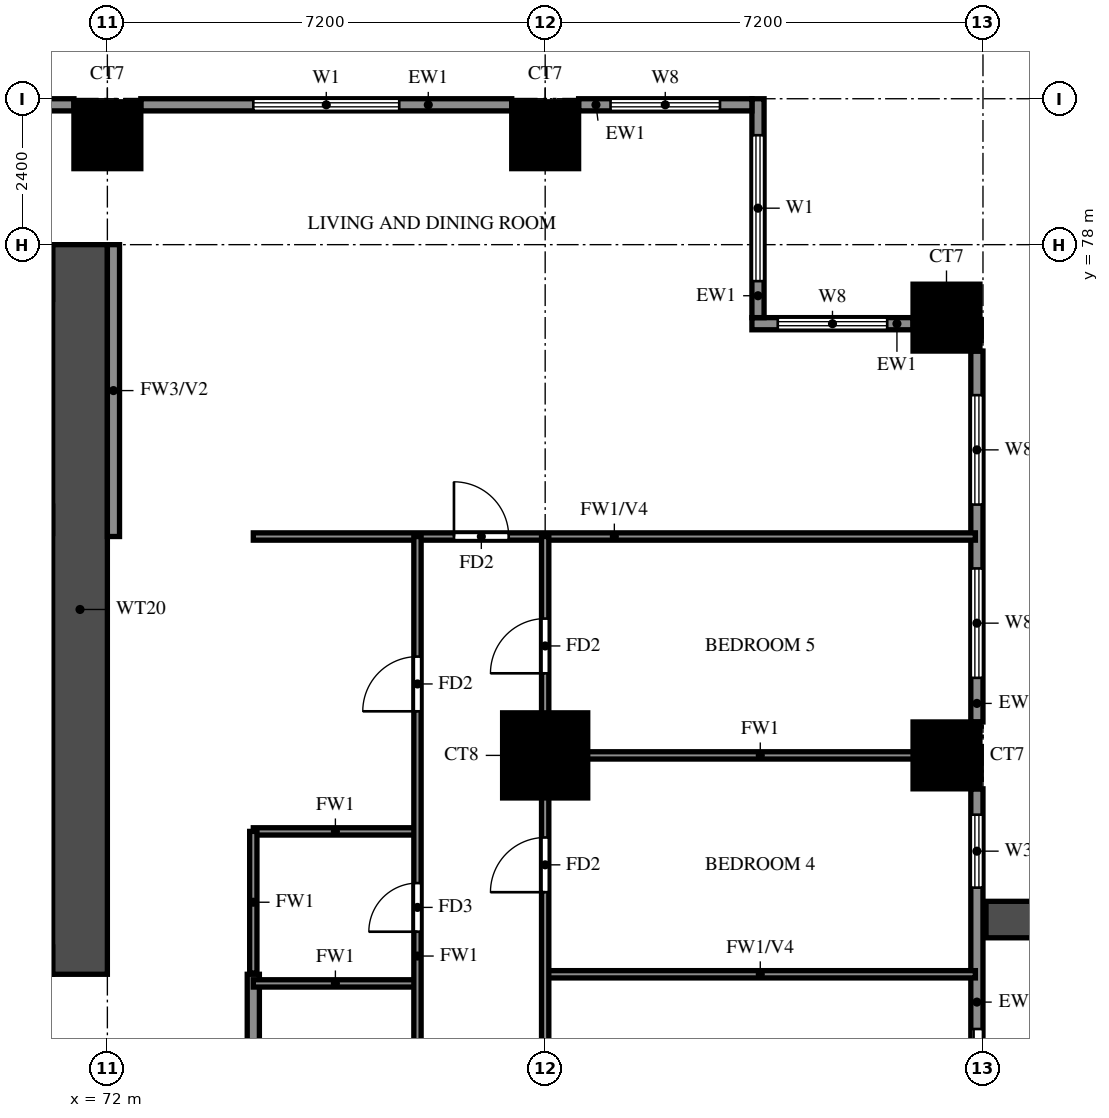
"""IFC4 building model, lengths in metres.
Left out: names, types, materials, properties, quantities, classifications, styles, units other than length and angle.
Written with IfcOpenShell. Run it as: python <this file> out.ifc"""

import sys

from ifc_helpers import new_model, si_unit, direction, frame, frame_2d, origin, origin_2d, place, context, subcontext, project, spatial, rectangle, extrude, source, transform, mapped, element, fill, save


model = new_model("IFC4")
c1 = context("Model", 3, precision=1e-05, world=origin(), true_north=direction((0.0, 1.0)))
c2 = subcontext(c1, "Body", "Model", "MODEL_VIEW")
j1 = project(units=[si_unit("LENGTHUNIT", "METRE"), si_unit("PLANEANGLEUNIT", "RADIAN")], contexts=[c1])
p1 = place(None, origin())
s1 = spatial("IfcSite", under=j1, at=p1, CompositionType="ELEMENT")
p2 = place(p1, origin())
s2 = spatial("IfcBuilding", under=s1, at=p2, CompositionType="ELEMENT")
p3 = place(p2, frame((0.0, 0.0, 37.5)))
s3 = spatial("IfcBuildingStorey", under=s2, at=p3, CompositionType="ELEMENT", Elevation=37.5)
m1 = source(origin(), c2, "Body", "SweptSolid", [
    extrude(rectangle(XDim=1.4, YDim=1.4, at=origin_2d()), origin(), (0.0, 0.0, 1.0), 3.18),
])
p4 = place(p3, frame((79.2, 69.6, 0.0), z_axis=(0.0, 0.0, 1.0), x_axis=(1.0, 0.0, 0.0)))
e1 = element("IfcColumn", 1, at=p4, inside=s3, PredefinedType="COLUMN", context=c2, shape_type="MappedRepresentation", body=[
    mapped(m1, transform((0.0, 0.0, 0.0))),
])
m2 = source(origin(), c2, "Body", "SweptSolid", [
    extrude(rectangle(XDim=1.1, YDim=1.1, at=origin_2d()), origin(), (0.0, 0.0, 1.0), 3.18),
])
for number, where, z_axis, x_axis in (
    (2, (85.8, 69.6, 0.0), (0.0, 0.0, 1.0), (1.0, 0.0, 0.0)),
    (3, (85.8, 76.8, 0.0), (0.0, 0.0, 1.0), (1.0, 0.0, 0.0)),
    (4, (72.0, 79.8, 0.0), (0.0, 0.0, 1.0), (1.0, 0.0, 0.0)),
    (5, (79.2, 79.8, 0.0), (0.0, 0.0, 1.0), (1.0, 0.0, 0.0)),
):
    element("IfcColumn", number, at=place(p3, frame(where, z_axis=z_axis, x_axis=x_axis)), inside=s3, PredefinedType="COLUMN", context=c2, shape_type="MappedRepresentation", body=[
        mapped(m2, transform((0.0, 0.0, 0.0))),
    ])
p5 = place(p3, frame((71.55, 66.0, 0.0), z_axis=(0.0, 0.0, 1.0), x_axis=(0.0, 1.0, 0.0)))
e6 = element("IfcWall", 6, at=p5, inside=s3, PredefinedType="SHEAR", context=c2, shape_type="SweptSolid", body=[
    extrude(rectangle(XDim=12.0, YDim=0.9, at=frame_2d((6.0, 0.0))), origin(), (0.0, 0.0, 1.0), 3.18),
])
p6 = place(p3, frame((29.7, 77.55, 0.0), z_axis=(0.0, 0.0, 1.0), x_axis=(1.0, 0.0, 0.0)))
e7 = element("IfcWall", 7, at=p6, inside=s3, PredefinedType="SHEAR", context=c2, shape_type="SweptSolid", body=[
    extrude(rectangle(XDim=41.4, YDim=0.9, at=frame_2d((20.7, 0.0))), origin(), (0.0, 0.0, 1.0), 3.18),
])
p7 = place(p3, frame((29.7, 66.225, 0.0), z_axis=(0.0, 0.0, 1.0), x_axis=(1.0, 0.0, 0.0)))
e8 = element("IfcWall", 8, at=p7, inside=s3, PredefinedType="SHEAR", context=c2, shape_type="SweptSolid", body=[
    extrude(rectangle(XDim=41.4, YDim=0.45, at=frame_2d((20.7, 0.0))), origin(), (0.0, 0.0, 1.0), 3.18),
])
p8 = place(p7, frame((0.925, 0.0, 0.0)))
e9 = element("IfcOpeningElement", 9, at=p8, cuts=e8, PredefinedType="OPENING", context=c2, shape_type="SweptSolid", body=[
    extrude(rectangle(XDim=1.1, YDim=2.1, at=frame_2d((0.55, 1.05))), frame((0.0, 0.235, 0.0), z_axis=(0.0, -1.0, 0.0), x_axis=(1.0, 0.0, 0.0)), (0.0, 0.0, 1.0), 0.47),
])
p9 = place(p7, frame((3.738, 0.0, 0.0)))
e10 = element("IfcOpeningElement", 10, at=p9, cuts=e8, PredefinedType="OPENING", context=c2, shape_type="SweptSolid", body=[
    extrude(rectangle(XDim=1.8, YDim=2.1, at=frame_2d((0.9, 1.05))), frame((0.0, 0.235, 0.0), z_axis=(0.0, -1.0, 0.0), x_axis=(1.0, 0.0, 0.0)), (0.0, 0.0, 1.0), 0.47),
])
p10 = place(p3, frame((86.3, 62.95, 0.0), z_axis=(0.0, 0.0, 1.0), x_axis=(0.0, 1.0, 0.0)))
e11 = element("IfcWall", 11, at=p10, inside=s3, PredefinedType="SOLIDWALL", context=c2, shape_type="SweptSolid", body=[
    extrude(rectangle(XDim=6.1, YDim=0.2, at=frame_2d((3.05, 0.0))), origin(), (0.0, 0.0, 1.0), 3.18),
])
p11 = place(p10, frame((0.35, 0.0, 0.0)))
e12 = element("IfcOpeningElement", 12, at=p11, cuts=e11, PredefinedType="OPENING", context=c2, shape_type="SweptSolid", body=[
    extrude(rectangle(XDim=1.8, YDim=2.4, at=frame_2d((0.9, 1.2))), frame((0.0, 0.11, 0.0), z_axis=(0.0, -1.0, 0.0), x_axis=(1.0, 0.0, 0.0)), (0.0, 0.0, 1.0), 0.22),
])
p12 = place(p10, frame((4.475, 0.0, 0.6)))
e13 = element("IfcOpeningElement", 13, at=p12, cuts=e11, PredefinedType="OPENING", context=c2, shape_type="SweptSolid", body=[
    extrude(rectangle(XDim=1.2, YDim=2.4, at=frame_2d((0.6, 1.2))), frame((0.0, 0.11, 0.0), z_axis=(0.0, -1.0, 0.0), x_axis=(1.0, 0.0, 0.0)), (0.0, 0.0, 1.0), 0.22),
])
p13 = place(p3, frame((86.3, 70.15, 0.0), z_axis=(0.0, 0.0, 1.0), x_axis=(0.0, 1.0, 0.0)))
e14 = element("IfcWall", 14, at=p13, inside=s3, PredefinedType="SOLIDWALL", context=c2, shape_type="SweptSolid", body=[
    extrude(rectangle(XDim=6.1, YDim=0.2, at=frame_2d((3.05, 0.0))), origin(), (0.0, 0.0, 1.0), 3.18),
])
p14 = place(p13, frame((0.725, 0.0, 0.6)))
e15 = element("IfcOpeningElement", 15, at=p14, cuts=e14, PredefinedType="OPENING", context=c2, shape_type="SweptSolid", body=[
    extrude(rectangle(XDim=1.8, YDim=2.4, at=frame_2d((0.9, 1.2))), frame((0.0, 0.11, 0.0), z_axis=(0.0, -1.0, 0.0), x_axis=(1.0, 0.0, 0.0)), (0.0, 0.0, 1.0), 0.22),
])
p15 = place(p13, frame((3.575, 0.0, 0.6)))
e16 = element("IfcOpeningElement", 16, at=p15, cuts=e14, PredefinedType="OPENING", context=c2, shape_type="SweptSolid", body=[
    extrude(rectangle(XDim=1.8, YDim=2.4, at=frame_2d((0.9, 1.2))), frame((0.0, 0.11, 0.0), z_axis=(0.0, -1.0, 0.0), x_axis=(1.0, 0.0, 0.0)), (0.0, 0.0, 1.0), 0.22),
])
p16 = place(p3, frame((85.25, 76.7, 0.0), z_axis=(0.0, 0.0, 1.0), x_axis=(-1.0, 0.0, 0.0)))
e17 = element("IfcWall", 17, at=p16, inside=s3, PredefinedType="SOLIDWALL", context=c2, shape_type="SweptSolid", body=[
    extrude(rectangle(XDim=2.65, YDim=0.2, at=frame_2d((1.325, 0.0))), origin(), (0.0, 0.0, 1.0), 3.18),
])
p17 = place(p16, frame((0.425, 0.0, 0.6)))
e18 = element("IfcOpeningElement", 18, at=p17, cuts=e17, PredefinedType="OPENING", context=c2, shape_type="SweptSolid", body=[
    extrude(rectangle(XDim=1.8, YDim=2.4, at=frame_2d((0.9, 1.2))), frame((0.0, 0.11, 0.0), z_axis=(0.0, -1.0, 0.0), x_axis=(1.0, 0.0, 0.0)), (0.0, 0.0, 1.0), 0.22),
])
p18 = place(p3, frame((82.7, 76.8, 0.0), z_axis=(0.0, 0.0, 1.0), x_axis=(0.0, 1.0, 0.0)))
e19 = element("IfcWall", 19, at=p18, inside=s3, PredefinedType="SOLIDWALL", context=c2, shape_type="SweptSolid", body=[
    extrude(rectangle(XDim=3.6, YDim=0.2, at=frame_2d((1.8, 0.0))), origin(), (0.0, 0.0, 1.0), 3.18),
])
p19 = place(p18, frame((0.6, 0.0, 0.6)))
e20 = element("IfcOpeningElement", 20, at=p19, cuts=e19, PredefinedType="OPENING", context=c2, shape_type="SweptSolid", body=[
    extrude(rectangle(XDim=2.4, YDim=2.4, at=frame_2d((1.2, 1.2))), frame((0.0, 0.11, 0.0), z_axis=(0.0, -1.0, 0.0), x_axis=(1.0, 0.0, 0.0)), (0.0, 0.0, 1.0), 0.22),
])
p20 = place(p3, frame((82.6, 80.3, 0.0), z_axis=(0.0, 0.0, 1.0), x_axis=(-1.0, 0.0, 0.0)))
e21 = element("IfcWall", 21, at=p20, inside=s3, PredefinedType="SOLIDWALL", context=c2, shape_type="SweptSolid", body=[
    extrude(rectangle(XDim=2.85, YDim=0.2, at=frame_2d((1.425, 0.0))), origin(), (0.0, 0.0, 1.0), 3.18),
])
p21 = place(p20, frame((0.525, 0.0, 0.6)))
e22 = element("IfcOpeningElement", 22, at=p21, cuts=e21, PredefinedType="OPENING", context=c2, shape_type="SweptSolid", body=[
    extrude(rectangle(XDim=1.8, YDim=2.4, at=frame_2d((0.9, 1.2))), frame((0.0, 0.11, 0.0), z_axis=(0.0, -1.0, 0.0), x_axis=(1.0, 0.0, 0.0)), (0.0, 0.0, 1.0), 0.22),
])
p22 = place(p3, frame((78.65, 80.3, 0.0), z_axis=(0.0, 0.0, 1.0), x_axis=(-1.0, 0.0, 0.0)))
e23 = element("IfcWall", 23, at=p22, inside=s3, PredefinedType="SOLIDWALL", context=c2, shape_type="SweptSolid", body=[
    extrude(rectangle(XDim=6.1, YDim=0.2, at=frame_2d((3.05, 0.0))), origin(), (0.0, 0.0, 1.0), 3.18),
])
p23 = place(p22, frame((1.85, 0.0, 0.6)))
e24 = element("IfcOpeningElement", 24, at=p23, cuts=e23, PredefinedType="OPENING", context=c2, shape_type="SweptSolid", body=[
    extrude(rectangle(XDim=2.4, YDim=2.4, at=frame_2d((1.2, 1.2))), frame((0.0, 0.11, 0.0), z_axis=(0.0, -1.0, 0.0), x_axis=(1.0, 0.0, 0.0)), (0.0, 0.0, 1.0), 0.22),
])
p24 = place(p3, frame((71.45, 80.3, 0.0), z_axis=(0.0, 0.0, 1.0), x_axis=(-1.0, 0.0, 0.0)))
e25 = element("IfcWall", 25, at=p24, inside=s3, PredefinedType="SOLIDWALL", context=c2, shape_type="SweptSolid", body=[
    extrude(rectangle(XDim=6.1, YDim=0.2, at=frame_2d((3.05, 0.0))), origin(), (0.0, 0.0, 1.0), 3.18),
])
p25 = place(p3, frame((86.45, 66.9, 0.0), z_axis=(0.0, 0.0, 1.0), x_axis=(1.0, 0.0, 0.0)))
e26 = element("IfcWall", 26, at=p25, inside=s3, PredefinedType="SOLIDWALL", context=c2, shape_type="SweptSolid", body=[
    extrude(rectangle(XDim=2.65, YDim=0.6, at=frame_2d((1.325, 0.0))), origin(), (0.0, 0.0, 1.0), 2.85),
])
p26 = place(p3, frame((72.1, 73.2, 0.0), z_axis=(0.0, 0.0, 1.0), x_axis=(0.0, 1.0, 0.0)))
e27 = element("IfcWall", 27, at=p26, inside=s3, PredefinedType="SOLIDWALL", context=c2, shape_type="SweptSolid", body=[
    extrude(rectangle(XDim=4.8, YDim=0.2, at=frame_2d((2.4, 0.0))), origin(), (0.0, 0.0, 1.0), 3.18),
])
p27 = place(p3, frame((74.4, 56.4, 0.0), z_axis=(0.0, 0.0, 1.0), x_axis=(0.0, 1.0, 0.0)))
e28 = element("IfcWall", 28, at=p27, inside=s3, PredefinedType="SOLIDWALL", context=c2, shape_type="SweptSolid", body=[
    extrude(rectangle(XDim=9.6, YDim=0.2, at=frame_2d((4.8, 0.0))), origin(), (0.0, 0.0, 1.0), 3.18),
])
p28 = place(p27, frame((0.7, 0.0, 0.0)))
e29 = element("IfcOpeningElement", 29, at=p28, cuts=e28, PredefinedType="OPENING", context=c2, shape_type="SweptSolid", body=[
    extrude(rectangle(XDim=1.0, YDim=2.1, at=frame_2d((0.5, 1.05))), frame((0.0, 0.11, 0.0), z_axis=(0.0, -1.0, 0.0), x_axis=(1.0, 0.0, 0.0)), (0.0, 0.0, 1.0), 0.22),
])
p29 = place(p27, frame((3.1, 0.0, 0.0)))
e30 = element("IfcOpeningElement", 30, at=p29, cuts=e28, PredefinedType="OPENING", context=c2, shape_type="SweptSolid", body=[
    extrude(rectangle(XDim=1.0, YDim=2.1, at=frame_2d((0.5, 1.05))), frame((0.0, 0.11, 0.0), z_axis=(0.0, -1.0, 0.0), x_axis=(1.0, 0.0, 0.0)), (0.0, 0.0, 1.0), 0.22),
])
p30 = place(p3, frame((74.4, 65.85, 0.0), z_axis=(0.0, 0.0, 1.0), x_axis=(1.0, 0.0, 0.0)))
e31 = element("IfcWall", 31, at=p30, inside=s3, PredefinedType="PARTITIONING", context=c2, shape_type="SweptSolid", body=[
    extrude(rectangle(XDim=2.7, YDim=0.12, at=frame_2d((1.35, 0.0))), origin(), (0.0, 0.0, 1.0), 3.18),
])
p31 = place(p3, frame((79.2, 66.0, 0.0), z_axis=(0.0, 0.0, 1.0), x_axis=(1.0, 0.0, 0.0)))
e32 = element("IfcWall", 32, at=p31, inside=s3, PredefinedType="PARTITIONING", context=c2, shape_type="SweptSolid", body=[
    extrude(rectangle(XDim=7.075, YDim=0.12, at=frame_2d((3.538, 0.0))), origin(), (0.0, 0.0, 1.0), 2.28),
])
p32 = place(p3, frame((74.4, 68.35, 0.0), z_axis=(0.0, 0.0, 1.0), x_axis=(1.0, 0.0, 0.0)))
e33 = element("IfcWall", 33, at=p32, inside=s3, PredefinedType="PARTITIONING", context=c2, shape_type="SweptSolid", body=[
    extrude(rectangle(XDim=2.7, YDim=0.12, at=frame_2d((1.35, 0.0))), origin(), (0.0, 0.0, 1.0), 3.18),
])
p33 = place(p3, frame((79.2, 69.6, 0.0), z_axis=(0.0, 0.0, 1.0), x_axis=(1.0, 0.0, 0.0)))
e34 = element("IfcWall", 34, at=p33, inside=s3, PredefinedType="PARTITIONING", context=c2, shape_type="SweptSolid", body=[
    extrude(rectangle(XDim=7.075, YDim=0.12, at=frame_2d((3.538, 0.0))), origin(), (0.0, 0.0, 1.0), 3.18),
])
p34 = place(p3, frame((74.4, 73.2, 0.0), z_axis=(0.0, 0.0, 1.0), x_axis=(1.0, 0.0, 0.0)))
e35 = element("IfcWall", 35, at=p34, inside=s3, PredefinedType="PARTITIONING", context=c2, shape_type="SweptSolid", body=[
    extrude(rectangle(XDim=11.875, YDim=0.12, at=frame_2d((5.938, 0.0))), origin(), (0.0, 0.0, 1.0), 2.28),
])
p35 = place(p34, frame((3.3, 0.0, 0.0)))
e36 = element("IfcOpeningElement", 36, at=p35, cuts=e35, PredefinedType="OPENING", context=c2, shape_type="SweptSolid", body=[
    extrude(rectangle(XDim=0.9, YDim=2.1, at=frame_2d((0.45, 1.05))), frame((0.0, 0.07, 0.0), z_axis=(0.0, -1.0, 0.0), x_axis=(1.0, 0.0, 0.0)), (0.0, 0.0, 1.0), 0.14),
])
p36 = place(p3, frame((74.4, 66.02, 0.0), z_axis=(0.0, 0.0, 1.0), x_axis=(0.0, 1.0, 0.0)))
e37 = element("IfcWall", 37, at=p36, inside=s3, PredefinedType="PARTITIONING", context=c2, shape_type="SweptSolid", body=[
    extrude(rectangle(XDim=2.33, YDim=0.12, at=frame_2d((1.165, 0.0))), origin(), (0.0, 0.0, 1.0), 3.18),
])
p37 = place(p3, frame((77.1, 61.2, 0.0), z_axis=(0.0, 0.0, 1.0), x_axis=(0.0, 1.0, 0.0)))
e38 = element("IfcWall", 38, at=p37, inside=s3, PredefinedType="PARTITIONING", context=c2, shape_type="SweptSolid", body=[
    extrude(rectangle(XDim=12.0, YDim=0.12, at=frame_2d((6.0, 0.0))), origin(), (0.0, 0.0, 1.0), 3.18),
])
p38 = place(p37, frame((1.875, 0.0, 0.0)))
e39 = element("IfcOpeningElement", 39, at=p38, cuts=e38, PredefinedType="OPENING", context=c2, shape_type="SweptSolid", body=[
    extrude(rectangle(XDim=0.9, YDim=2.1, at=frame_2d((0.45, 1.05))), frame((0.0, 0.07, 0.0), z_axis=(0.0, -1.0, 0.0), x_axis=(1.0, 0.0, 0.0)), (0.0, 0.0, 1.0), 0.14),
])
p39 = place(p37, frame((5.5, 0.0, 0.0)))
e40 = element("IfcOpeningElement", 40, at=p39, cuts=e38, PredefinedType="OPENING", context=c2, shape_type="SweptSolid", body=[
    extrude(rectangle(XDim=0.8, YDim=2.1, at=frame_2d((0.4, 1.05))), frame((0.0, 0.07, 0.0), z_axis=(0.0, -1.0, 0.0), x_axis=(1.0, 0.0, 0.0)), (0.0, 0.0, 1.0), 0.14),
])
p40 = place(p37, frame((9.125, 0.0, 0.0)))
e41 = element("IfcOpeningElement", 41, at=p40, cuts=e38, PredefinedType="OPENING", context=c2, shape_type="SweptSolid", body=[
    extrude(rectangle(XDim=0.9, YDim=2.1, at=frame_2d((0.45, 1.05))), frame((0.0, 0.07, 0.0), z_axis=(0.0, -1.0, 0.0), x_axis=(1.0, 0.0, 0.0)), (0.0, 0.0, 1.0), 0.14),
])
p41 = place(p3, frame((79.2, 55.2, 0.0), z_axis=(0.0, 0.0, 1.0), x_axis=(0.0, 1.0, 0.0)))
e42 = element("IfcWall", 42, at=p41, inside=s3, PredefinedType="PARTITIONING", context=c2, shape_type="SweptSolid", body=[
    extrude(rectangle(XDim=18.0, YDim=0.12, at=frame_2d((9.0, 0.0))), origin(), (0.0, 0.0, 1.0), 3.18),
])
p42 = place(p41, frame((1.05, 0.0, 0.0)))
e43 = element("IfcOpeningElement", 43, at=p42, cuts=e42, PredefinedType="OPENING", context=c2, shape_type="SweptSolid", body=[
    extrude(rectangle(XDim=1.5, YDim=2.1, at=frame_2d((0.75, 1.05))), frame((0.0, 0.07, 0.0), z_axis=(0.0, -1.0, 0.0), x_axis=(1.0, 0.0, 0.0)), (0.0, 0.0, 1.0), 0.14),
])
p43 = place(p41, frame((4.95, 0.0, 0.0)))
e44 = element("IfcOpeningElement", 44, at=p43, cuts=e42, PredefinedType="OPENING", context=c2, shape_type="SweptSolid", body=[
    extrude(rectangle(XDim=0.9, YDim=2.1, at=frame_2d((0.45, 1.05))), frame((0.0, 0.07, 0.0), z_axis=(0.0, -1.0, 0.0), x_axis=(1.0, 0.0, 0.0)), (0.0, 0.0, 1.0), 0.14),
])
p44 = place(p41, frame((8.55, 0.0, 0.0)))
e45 = element("IfcOpeningElement", 45, at=p44, cuts=e42, PredefinedType="OPENING", context=c2, shape_type="SweptSolid", body=[
    extrude(rectangle(XDim=0.9, YDim=2.1, at=frame_2d((0.45, 1.05))), frame((0.0, 0.07, 0.0), z_axis=(0.0, -1.0, 0.0), x_axis=(1.0, 0.0, 0.0)), (0.0, 0.0, 1.0), 0.14),
])
p45 = place(p41, frame((12.15, 0.0, 0.0)))
e46 = element("IfcOpeningElement", 46, at=p45, cuts=e42, PredefinedType="OPENING", context=c2, shape_type="SweptSolid", body=[
    extrude(rectangle(XDim=0.9, YDim=2.1, at=frame_2d((0.45, 1.05))), frame((0.0, 0.07, 0.0), z_axis=(0.0, -1.0, 0.0), x_axis=(1.0, 0.0, 0.0)), (0.0, 0.0, 1.0), 0.14),
])
p46 = place(p41, frame((15.75, 0.0, 0.0)))
e47 = element("IfcOpeningElement", 47, at=p46, cuts=e42, PredefinedType="OPENING", context=c2, shape_type="SweptSolid", body=[
    extrude(rectangle(XDim=0.9, YDim=2.1, at=frame_2d((0.45, 1.05))), frame((0.0, 0.07, 0.0), z_axis=(0.0, -1.0, 0.0), x_axis=(1.0, 0.0, 0.0)), (0.0, 0.0, 1.0), 0.14),
])
p47 = place(p11, origin())
e48 = element("IfcDoor", 48, at=p47, inside=s3, OperationType="DOUBLE_DOOR_SLIDING", PredefinedType="DOOR", context=c2, shape_type="SweptSolid", body=[
    extrude(rectangle(XDim=1.8, YDim=2.4, at=frame_2d((0.9, 1.2))), frame((0.0, 0.025, 0.0), z_axis=(0.0, -1.0, 0.0), x_axis=(1.0, 0.0, 0.0)), (0.0, 0.0, 1.0), 0.05),
])
fill(e12, e48)
p48 = place(p12, origin())
e49 = element("IfcWindow", 49, at=p48, inside=s3, PartitioningType="SINGLE_PANEL", PredefinedType="WINDOW", context=c2, shape_type="SweptSolid", body=[
    extrude(rectangle(XDim=1.2, YDim=2.4, at=frame_2d((0.6, 1.2))), frame((0.0, 0.03, 0.0), z_axis=(0.0, -1.0, 0.0), x_axis=(1.0, 0.0, 0.0)), (0.0, 0.0, 1.0), 0.06),
])
fill(e13, e49)
p49 = place(p14, origin())
e50 = element("IfcWindow", 50, at=p49, inside=s3, PartitioningType="DOUBLE_PANEL_VERTICAL", PredefinedType="WINDOW", context=c2, shape_type="SweptSolid", body=[
    extrude(rectangle(XDim=1.8, YDim=2.4, at=frame_2d((0.9, 1.2))), frame((0.0, 0.03, 0.0), z_axis=(0.0, -1.0, 0.0), x_axis=(1.0, 0.0, 0.0)), (0.0, 0.0, 1.0), 0.06),
])
fill(e15, e50)
p50 = place(p15, origin())
e51 = element("IfcWindow", 51, at=p50, inside=s3, PartitioningType="DOUBLE_PANEL_VERTICAL", PredefinedType="WINDOW", context=c2, shape_type="SweptSolid", body=[
    extrude(rectangle(XDim=1.8, YDim=2.4, at=frame_2d((0.9, 1.2))), frame((0.0, 0.03, 0.0), z_axis=(0.0, -1.0, 0.0), x_axis=(1.0, 0.0, 0.0)), (0.0, 0.0, 1.0), 0.06),
])
fill(e16, e51)
p51 = place(p17, origin())
e52 = element("IfcWindow", 52, at=p51, inside=s3, PartitioningType="DOUBLE_PANEL_VERTICAL", PredefinedType="WINDOW", context=c2, shape_type="SweptSolid", body=[
    extrude(rectangle(XDim=1.8, YDim=2.4, at=frame_2d((0.9, 1.2))), frame((0.0, 0.03, 0.0), z_axis=(0.0, -1.0, 0.0), x_axis=(1.0, 0.0, 0.0)), (0.0, 0.0, 1.0), 0.06),
])
fill(e18, e52)
p52 = place(p19, origin())
e53 = element("IfcWindow", 53, at=p52, inside=s3, PartitioningType="DOUBLE_PANEL_VERTICAL", PredefinedType="WINDOW", context=c2, shape_type="SweptSolid", body=[
    extrude(rectangle(XDim=2.4, YDim=2.4, at=frame_2d((1.2, 1.2))), frame((0.0, 0.03, 0.0), z_axis=(0.0, -1.0, 0.0), x_axis=(1.0, 0.0, 0.0)), (0.0, 0.0, 1.0), 0.06),
])
fill(e20, e53)
p53 = place(p21, origin())
e54 = element("IfcWindow", 54, at=p53, inside=s3, PartitioningType="DOUBLE_PANEL_VERTICAL", PredefinedType="WINDOW", context=c2, shape_type="SweptSolid", body=[
    extrude(rectangle(XDim=1.8, YDim=2.4, at=frame_2d((0.9, 1.2))), frame((0.0, 0.03, 0.0), z_axis=(0.0, -1.0, 0.0), x_axis=(1.0, 0.0, 0.0)), (0.0, 0.0, 1.0), 0.06),
])
fill(e22, e54)
p54 = place(p23, origin())
e55 = element("IfcWindow", 55, at=p54, inside=s3, PartitioningType="DOUBLE_PANEL_VERTICAL", PredefinedType="WINDOW", context=c2, shape_type="SweptSolid", body=[
    extrude(rectangle(XDim=2.4, YDim=2.4, at=frame_2d((1.2, 1.2))), frame((0.0, 0.03, 0.0), z_axis=(0.0, -1.0, 0.0), x_axis=(1.0, 0.0, 0.0)), (0.0, 0.0, 1.0), 0.06),
])
fill(e24, e55)
p55 = place(p45, origin())
e56 = element("IfcDoor", 56, at=p55, inside=s3, OperationType="SINGLE_SWING_RIGHT", PredefinedType="DOOR", context=c2, shape_type="SweptSolid", body=[
    extrude(rectangle(XDim=0.9, YDim=2.1, at=frame_2d((0.45, 1.05))), frame((0.0, 0.025, 0.0), z_axis=(0.0, -1.0, 0.0), x_axis=(1.0, 0.0, 0.0)), (0.0, 0.0, 1.0), 0.05),
])
fill(e46, e56)
p56 = place(p46, origin())
e57 = element("IfcDoor", 57, at=p56, inside=s3, OperationType="SINGLE_SWING_LEFT", PredefinedType="DOOR", context=c2, shape_type="SweptSolid", body=[
    extrude(rectangle(XDim=0.9, YDim=2.1, at=frame_2d((0.45, 1.05))), frame((0.0, 0.025, 0.0), z_axis=(0.0, -1.0, 0.0), x_axis=(1.0, 0.0, 0.0)), (0.0, 0.0, 1.0), 0.05),
])
fill(e47, e57)
p57 = place(p35, origin())
e58 = element("IfcDoor", 58, at=p57, inside=s3, OperationType="SINGLE_SWING_LEFT", PredefinedType="DOOR", context=c2, shape_type="SweptSolid", body=[
    extrude(rectangle(XDim=0.9, YDim=2.1, at=frame_2d((0.45, 1.05))), frame((0.0, 0.025, 0.0), z_axis=(0.0, -1.0, 0.0), x_axis=(1.0, 0.0, 0.0)), (0.0, 0.0, 1.0), 0.05),
])
fill(e36, e58)
p58 = place(p39, origin())
e59 = element("IfcDoor", 59, at=p58, inside=s3, OperationType="SINGLE_SWING_LEFT", PredefinedType="DOOR", context=c2, shape_type="SweptSolid", body=[
    extrude(rectangle(XDim=0.8, YDim=2.1, at=frame_2d((0.4, 1.05))), frame((0.0, 0.025, 0.0), z_axis=(0.0, -1.0, 0.0), x_axis=(1.0, 0.0, 0.0)), (0.0, 0.0, 1.0), 0.05),
])
fill(e40, e59)
p59 = place(p40, origin())
e60 = element("IfcDoor", 60, at=p59, inside=s3, OperationType="SINGLE_SWING_LEFT", PredefinedType="DOOR", context=c2, shape_type="SweptSolid", body=[
    extrude(rectangle(XDim=0.9, YDim=2.1, at=frame_2d((0.45, 1.05))), frame((0.0, 0.025, 0.0), z_axis=(0.0, -1.0, 0.0), x_axis=(1.0, 0.0, 0.0)), (0.0, 0.0, 1.0), 0.05),
])
fill(e41, e60)
save(model, sys.argv[1])
